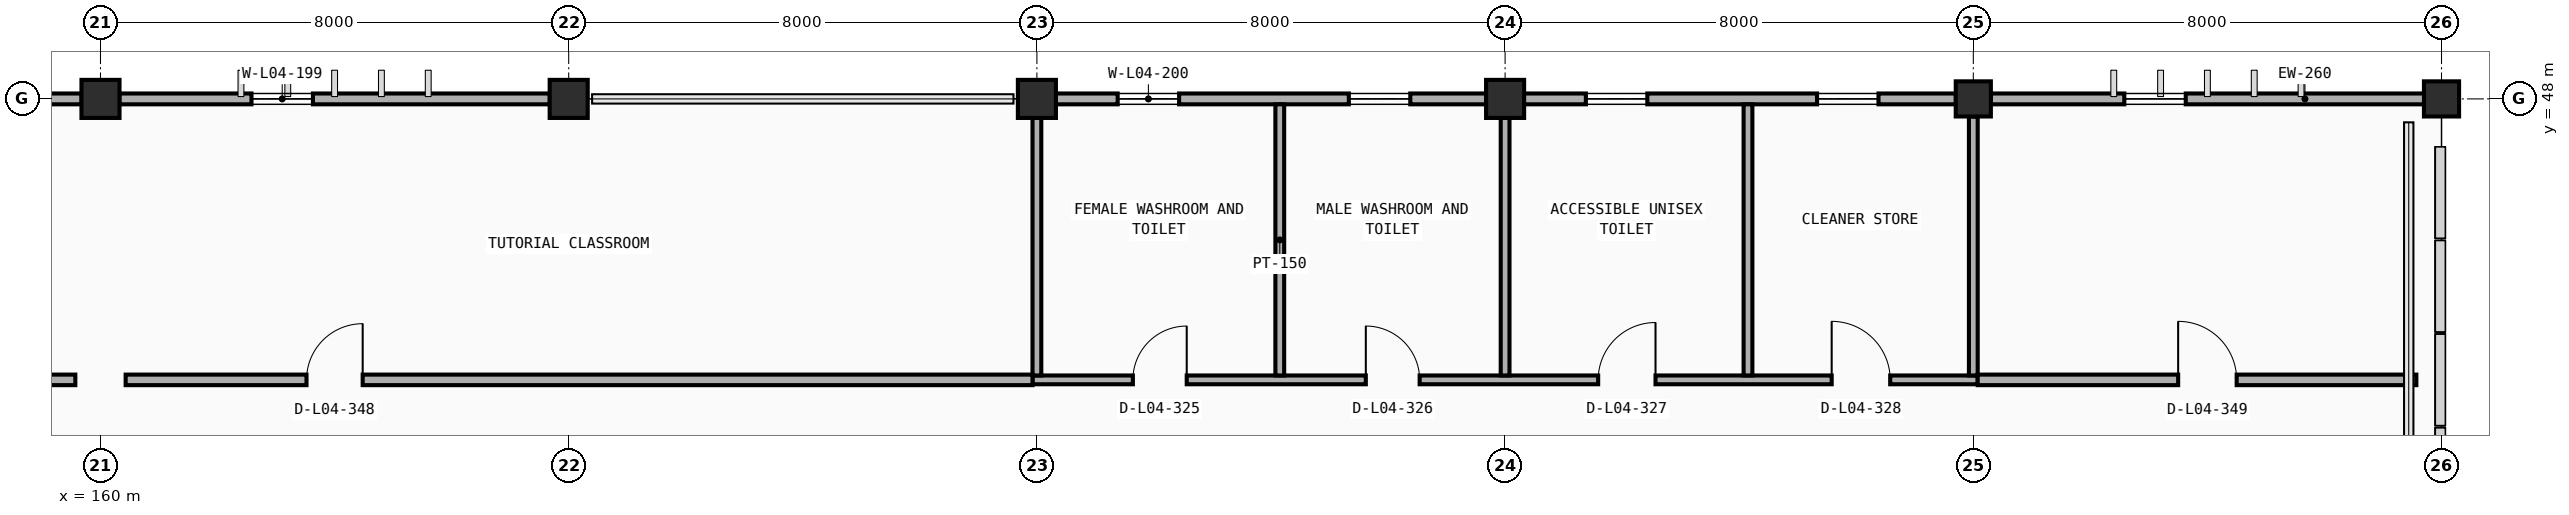
"""IFC4 building model, lengths in metres.
Left out: names, types, materials, properties, quantities, classifications, styles, units other than length and angle.
Written with IfcOpenShell. Run it as: python <this file> out.ifc"""

import sys

from ifc_helpers import new_model, si_unit, direction, frame, frame_2d, origin, origin_2d, place, context, subcontext, project, spatial, rectangle, extrude, element, fill, save


model = new_model("IFC4")
c1 = context("Model", 3, precision=1e-05, world=origin(), true_north=direction((0.0, 1.0)))
c2 = subcontext(c1, "Body", "Model", "MODEL_VIEW")
j1 = project(units=[si_unit("LENGTHUNIT", "METRE"), si_unit("PLANEANGLEUNIT", "RADIAN")], contexts=[c1])
p1 = place(None, origin())
s1 = spatial("IfcSite", under=j1, at=p1, CompositionType="ELEMENT")
p2 = place(p1, origin())
s2 = spatial("IfcBuilding", under=s1, at=p2, CompositionType="ELEMENT")
p3 = place(p2, frame((0.0, 0.0, 13.8)))
s3 = spatial("IfcBuildingStorey", under=s2, at=p3, CompositionType="ELEMENT", Elevation=13.8)
for number, where, z_axis, x_axis in (
    (1, (160.0, 48.0, 0.0), (0.0, 0.0, 1.0), (1.0, 0.0, 0.0)),
    (2, (168.0, 48.0, 0.0), (0.0, 0.0, 1.0), (1.0, 0.0, 0.0)),
    (3, (176.0, 48.0, 0.0), (0.0, 0.0, 1.0), (1.0, 0.0, 0.0)),
    (4, (184.0, 48.0, 0.0), (0.0, 0.0, 1.0), (1.0, 0.0, 0.0)),
):
    element("IfcColumn", number, at=place(p3, frame(where, z_axis=z_axis, x_axis=x_axis)), inside=s3, PredefinedType="COLUMN", context=c2, shape_type="SweptSolid", body=[
        extrude(rectangle(XDim=0.65, YDim=0.65, at=origin_2d()), origin(), (0.0, 0.0, 1.0), 4.2),
    ])
for number, where, z_axis, x_axis in (
    (5, (192.0, 48.0, 0.0), (0.0, 0.0, 1.0), (1.0, 0.0, 0.0)),
    (6, (200.0, 48.0, 0.0), (0.0, 0.0, 1.0), (1.0, 0.0, 0.0)),
):
    element("IfcColumn", number, at=place(p3, frame(where, z_axis=z_axis, x_axis=x_axis)), inside=s3, PredefinedType="COLUMN", context=c2, shape_type="SweptSolid", body=[
        extrude(rectangle(XDim=0.6, YDim=0.6, at=origin_2d()), origin(), (0.0, 0.0, 1.0), 4.2),
    ])
p4 = place(p3, frame((152.322, 48.0, 0.0), z_axis=(0.0, 0.0, 1.0), x_axis=(1.0, 0.0, 0.0)))
e7 = element("IfcWall", 7, at=p4, inside=s3, PredefinedType="STANDARD", context=c2, shape_type="SweptSolid", body=[
    extrude(rectangle(XDim=7.356, YDim=0.185, at=frame_2d((3.678, 0.0))), origin(), (0.0, 0.0, 1.0), 3.325),
])
p5 = place(p4, frame((2.258, 0.0, 0.9)))
e8 = element("IfcOpeningElement", 8, at=p5, cuts=e7, PredefinedType="OPENING", context=c2, shape_type="SweptSolid", body=[
    extrude(rectangle(XDim=1.65, YDim=1.85, at=frame_2d((0.825, 0.925))), frame((0.0, 0.103, 0.0), z_axis=(0.0, -1.0, 0.0), x_axis=(1.0, 0.0, 0.0)), (0.0, 0.0, 1.0), 0.205),
])
p6 = place(p3, frame((160.322, 48.0, 0.0), z_axis=(0.0, 0.0, 1.0), x_axis=(1.0, 0.0, 0.0)))
e9 = element("IfcWall", 9, at=p6, inside=s3, PredefinedType="STANDARD", context=c2, shape_type="SweptSolid", body=[
    extrude(rectangle(XDim=7.356, YDim=0.185, at=frame_2d((3.678, 0.0))), origin(), (0.0, 0.0, 1.0), 3.325),
])
p7 = place(p6, frame((2.258, 0.0, 0.9)))
e10 = element("IfcOpeningElement", 10, at=p7, cuts=e9, PredefinedType="OPENING", context=c2, shape_type="SweptSolid", body=[
    extrude(rectangle(XDim=1.05, YDim=1.85, at=frame_2d((0.525, 0.925))), frame((0.0, 0.103, 0.0), z_axis=(0.0, -1.0, 0.0), x_axis=(1.0, 0.0, 0.0)), (0.0, 0.0, 1.0), 0.205),
])
p8 = place(p3, frame((176.322, 48.0, 0.0), z_axis=(0.0, 0.0, 1.0), x_axis=(1.0, 0.0, 0.0)))
e11 = element("IfcWall", 11, at=p8, inside=s3, PredefinedType="STANDARD", context=c2, shape_type="SweptSolid", body=[
    extrude(rectangle(XDim=7.356, YDim=0.185, at=frame_2d((3.678, 0.0))), origin(), (0.0, 0.0, 1.0), 3.325),
])
p9 = place(p8, frame((1.058, 0.0, 1.15)))
e12 = element("IfcOpeningElement", 12, at=p9, cuts=e11, PredefinedType="OPENING", context=c2, shape_type="SweptSolid", body=[
    extrude(rectangle(XDim=1.05, YDim=1.25, at=frame_2d((0.525, 0.625))), frame((0.0, 0.103, 0.0), z_axis=(0.0, -1.0, 0.0), x_axis=(1.0, 0.0, 0.0)), (0.0, 0.0, 1.0), 0.205),
])
p10 = place(p8, frame((5.008, 0.0, 1.15)))
e13 = element("IfcOpeningElement", 13, at=p10, cuts=e11, PredefinedType="OPENING", context=c2, shape_type="SweptSolid", body=[
    extrude(rectangle(XDim=1.05, YDim=1.25, at=frame_2d((0.525, 0.625))), frame((0.0, 0.103, 0.0), z_axis=(0.0, -1.0, 0.0), x_axis=(1.0, 0.0, 0.0)), (0.0, 0.0, 1.0), 0.205),
])
p11 = place(p3, frame((184.322, 48.0, 0.0), z_axis=(0.0, 0.0, 1.0), x_axis=(1.0, 0.0, 0.0)))
e14 = element("IfcWall", 14, at=p11, inside=s3, PredefinedType="STANDARD", context=c2, shape_type="SweptSolid", body=[
    extrude(rectangle(XDim=7.381, YDim=0.185, at=frame_2d((3.69, 0.0))), origin(), (0.0, 0.0, 1.0), 3.325),
])
p12 = place(p11, frame((1.058, 0.0, 1.15)))
e15 = element("IfcOpeningElement", 15, at=p12, cuts=e14, PredefinedType="OPENING", context=c2, shape_type="SweptSolid", body=[
    extrude(rectangle(XDim=1.05, YDim=1.25, at=frame_2d((0.525, 0.625))), frame((0.0, 0.103, 0.0), z_axis=(0.0, -1.0, 0.0), x_axis=(1.0, 0.0, 0.0)), (0.0, 0.0, 1.0), 0.205),
])
p13 = place(p11, frame((5.008, 0.0, 1.15)))
e16 = element("IfcOpeningElement", 16, at=p13, cuts=e14, PredefinedType="OPENING", context=c2, shape_type="SweptSolid", body=[
    extrude(rectangle(XDim=1.05, YDim=1.25, at=frame_2d((0.525, 0.625))), frame((0.0, 0.103, 0.0), z_axis=(0.0, -1.0, 0.0), x_axis=(1.0, 0.0, 0.0)), (0.0, 0.0, 1.0), 0.205),
])
p14 = place(p3, frame((192.297, 48.0, 0.0), z_axis=(0.0, 0.0, 1.0), x_axis=(1.0, 0.0, 0.0)))
e17 = element("IfcWall", 17, at=p14, inside=s3, PredefinedType="STANDARD", context=c2, shape_type="SweptSolid", body=[
    extrude(rectangle(XDim=7.406, YDim=0.185, at=frame_2d((3.703, 0.0))), origin(), (0.0, 0.0, 1.0), 3.325),
])
p15 = place(p14, frame((2.283, 0.0, 0.9)))
e18 = element("IfcOpeningElement", 18, at=p15, cuts=e17, PredefinedType="OPENING", context=c2, shape_type="SweptSolid", body=[
    extrude(rectangle(XDim=1.05, YDim=1.85, at=frame_2d((0.525, 0.925))), frame((0.0, 0.103, 0.0), z_axis=(0.0, -1.0, 0.0), x_axis=(1.0, 0.0, 0.0)), (0.0, 0.0, 1.0), 0.205),
])
p16 = place(p3, frame((199.76, 47.78, 0.0), z_axis=(0.0, 0.0, 1.0), x_axis=(-1.0, 0.0, 0.0)))
e19 = element("IfcWall", 19, at=p16, inside=s3, PredefinedType="PARAPET", context=c2, shape_type="SweptSolid", body=[
    extrude(rectangle(XDim=0.32, YDim=0.2, at=frame_2d((0.16, 0.0))), origin(), (0.0, 0.0, 1.0), 3.35),
])
p17 = place(p3, frame((175.925, 43.2, 0.0), z_axis=(0.0, 0.0, 1.0), x_axis=(1.0, 0.0, 0.0)))
e20 = element("IfcWall", 20, at=p17, inside=s3, PredefinedType="PARTITIONING", context=c2, shape_type="SweptSolid", body=[
    extrude(rectangle(XDim=16.15, YDim=0.15, at=frame_2d((8.075, 0.0))), origin(), (0.0, 0.0, 1.0), 3.3),
])
p18 = place(p17, frame((1.715, 0.0, 0.0)))
e21 = element("IfcOpeningElement", 21, at=p18, cuts=e20, PredefinedType="OPENING", context=c2, shape_type="SweptSolid", body=[
    extrude(rectangle(XDim=0.92, YDim=2.12, at=frame_2d((0.46, 1.06))), frame((0.0, 0.085, 0.0), z_axis=(0.0, -1.0, 0.0), x_axis=(1.0, 0.0, 0.0)), (0.0, 0.0, 1.0), 0.17),
])
p19 = place(p17, frame((5.695, 0.0, 0.0)))
e22 = element("IfcOpeningElement", 22, at=p19, cuts=e20, PredefinedType="OPENING", context=c2, shape_type="SweptSolid", body=[
    extrude(rectangle(XDim=0.92, YDim=2.12, at=frame_2d((0.46, 1.06))), frame((0.0, 0.085, 0.0), z_axis=(0.0, -1.0, 0.0), x_axis=(1.0, 0.0, 0.0)), (0.0, 0.0, 1.0), 0.17),
])
p20 = place(p17, frame((9.665, 0.0, 0.0)))
e23 = element("IfcOpeningElement", 23, at=p20, cuts=e20, PredefinedType="OPENING", context=c2, shape_type="SweptSolid", body=[
    extrude(rectangle(XDim=0.98, YDim=2.12, at=frame_2d((0.49, 1.06))), frame((0.0, 0.085, 0.0), z_axis=(0.0, -1.0, 0.0), x_axis=(1.0, 0.0, 0.0)), (0.0, 0.0, 1.0), 0.17),
])
p21 = place(p17, frame((13.655, 0.0, 0.0)))
e24 = element("IfcOpeningElement", 24, at=p21, cuts=e20, PredefinedType="OPENING", context=c2, shape_type="SweptSolid", body=[
    extrude(rectangle(XDim=1.0, YDim=2.15, at=frame_2d((0.5, 1.075))), frame((0.0, 0.085, 0.0), z_axis=(0.0, -1.0, 0.0), x_axis=(1.0, 0.0, 0.0)), (0.0, 0.0, 1.0), 0.17),
])
p22 = place(p3, frame((176.0, 43.275, 0.0), z_axis=(0.0, 0.0, 1.0), x_axis=(0.0, 1.0, 0.0)))
e25 = element("IfcWall", 25, at=p22, inside=s3, PredefinedType="PARTITIONING", context=c2, shape_type="SweptSolid", body=[
    extrude(rectangle(XDim=4.4, YDim=0.15, at=frame_2d((2.2, 0.0))), origin(), (0.0, 0.0, 1.0), 3.225),
])
p23 = place(p3, frame((180.15, 43.275, 0.0), z_axis=(0.0, 0.0, 1.0), x_axis=(0.0, 1.0, 0.0)))
e26 = element("IfcWall", 26, at=p23, inside=s3, PredefinedType="PARTITIONING", context=c2, shape_type="SweptSolid", body=[
    extrude(rectangle(XDim=4.633, YDim=0.15, at=frame_2d((2.316, 0.0))), origin(), (0.0, 0.0, 1.0), 3.3),
])
p24 = place(p3, frame((184.0, 43.275, 0.0), z_axis=(0.0, 0.0, 1.0), x_axis=(0.0, 1.0, 0.0)))
e27 = element("IfcWall", 27, at=p24, inside=s3, PredefinedType="PARTITIONING", context=c2, shape_type="SweptSolid", body=[
    extrude(rectangle(XDim=4.4, YDim=0.15, at=frame_2d((2.2, 0.0))), origin(), (0.0, 0.0, 1.0), 3.225),
])
p25 = place(p3, frame((188.15, 43.275, 0.0), z_axis=(0.0, 0.0, 1.0), x_axis=(0.0, 1.0, 0.0)))
e28 = element("IfcWall", 28, at=p25, inside=s3, PredefinedType="PARTITIONING", context=c2, shape_type="SweptSolid", body=[
    extrude(rectangle(XDim=4.633, YDim=0.15, at=frame_2d((2.316, 0.0))), origin(), (0.0, 0.0, 1.0), 3.3),
])
p26 = place(p3, frame((192.0, 43.275, 0.0), z_axis=(0.0, 0.0, 1.0), x_axis=(0.0, 1.0, 0.0)))
e29 = element("IfcWall", 29, at=p26, inside=s3, PredefinedType="PARTITIONING", context=c2, shape_type="SweptSolid", body=[
    extrude(rectangle(XDim=4.425, YDim=0.15, at=frame_2d((2.212, 0.0))), origin(), (0.0, 0.0, 1.0), 3.225),
])
p27 = place(p3, frame((128.43, 43.2, 0.0), z_axis=(0.0, 0.0, 1.0), x_axis=(1.0, 0.0, 0.0)))
e30 = element("IfcWall", 30, at=p27, inside=s3, PredefinedType="PARTITIONING", context=c2, shape_type="SweptSolid", body=[
    extrude(rectangle(XDim=31.14, YDim=0.18, at=frame_2d((15.57, 0.0))), origin(), (0.0, 0.0, 1.0), 3.3),
])
p28 = place(p27, frame((3.11, 0.0, 0.0)))
e31 = element("IfcOpeningElement", 31, at=p28, cuts=e30, PredefinedType="OPENING", context=c2, shape_type="SweptSolid", body=[
    extrude(rectangle(XDim=0.92, YDim=2.15, at=frame_2d((0.46, 1.075))), frame((0.0, 0.1, 0.0), z_axis=(0.0, -1.0, 0.0), x_axis=(1.0, 0.0, 0.0)), (0.0, 0.0, 1.0), 0.2),
])
p29 = place(p3, frame((160.43, 43.2, 0.0), z_axis=(0.0, 0.0, 1.0), x_axis=(1.0, 0.0, 0.0)))
e32 = element("IfcWall", 32, at=p29, inside=s3, PredefinedType="PARTITIONING", context=c2, shape_type="SweptSolid", body=[
    extrude(rectangle(XDim=15.495, YDim=0.18, at=frame_2d((7.748, 0.0))), origin(), (0.0, 0.0, 1.0), 3.3),
])
p30 = place(p29, frame((3.09, 0.0, 0.0)))
e33 = element("IfcOpeningElement", 33, at=p30, cuts=e32, PredefinedType="OPENING", context=c2, shape_type="SweptSolid", body=[
    extrude(rectangle(XDim=0.96, YDim=2.15, at=frame_2d((0.48, 1.075))), frame((0.0, 0.1, 0.0), z_axis=(0.0, -1.0, 0.0), x_axis=(1.0, 0.0, 0.0)), (0.0, 0.0, 1.0), 0.2),
])
p31 = place(p3, frame((192.075, 43.2, 0.0), z_axis=(0.0, 0.0, 1.0), x_axis=(1.0, 0.0, 0.0)))
e34 = element("IfcWall", 34, at=p31, inside=s3, PredefinedType="PARTITIONING", context=c2, shape_type="SweptSolid", body=[
    extrude(rectangle(XDim=7.495, YDim=0.18, at=frame_2d((3.748, 0.0))), origin(), (0.0, 0.0, 1.0), 3.3),
])
p32 = place(p31, frame((3.425, 0.0, 0.0)))
e35 = element("IfcOpeningElement", 35, at=p32, cuts=e34, PredefinedType="OPENING", context=c2, shape_type="SweptSolid", body=[
    extrude(rectangle(XDim=1.0, YDim=2.15, at=frame_2d((0.5, 1.075))), frame((0.0, 0.1, 0.0), z_axis=(0.0, -1.0, 0.0), x_axis=(1.0, 0.0, 0.0)), (0.0, 0.0, 1.0), 0.2),
])
p33 = place(p7, origin())
e36 = element("IfcWindow", 36, at=p33, inside=s3, PartitioningType="SINGLE_PANEL", PredefinedType="WINDOW", context=c2, shape_type="SweptSolid", body=[
    extrude(rectangle(XDim=1.05, YDim=1.85, at=frame_2d((0.525, 0.925))), frame((0.0, 0.03, 0.0), z_axis=(0.0, -1.0, 0.0), x_axis=(1.0, 0.0, 0.0)), (0.0, 0.0, 1.0), 0.06),
])
fill(e10, e36)
p34 = place(p9, origin())
e37 = element("IfcWindow", 37, at=p34, inside=s3, PartitioningType="SINGLE_PANEL", PredefinedType="WINDOW", context=c2, shape_type="SweptSolid", body=[
    extrude(rectangle(XDim=1.05, YDim=1.25, at=frame_2d((0.525, 0.625))), frame((0.0, 0.03, 0.0), z_axis=(0.0, -1.0, 0.0), x_axis=(1.0, 0.0, 0.0)), (0.0, 0.0, 1.0), 0.06),
])
fill(e12, e37)
p35 = place(p10, origin())
e38 = element("IfcWindow", 38, at=p35, inside=s3, PartitioningType="SINGLE_PANEL", PredefinedType="WINDOW", context=c2, shape_type="SweptSolid", body=[
    extrude(rectangle(XDim=1.05, YDim=1.25, at=frame_2d((0.525, 0.625))), frame((0.0, 0.03, 0.0), z_axis=(0.0, -1.0, 0.0), x_axis=(1.0, 0.0, 0.0)), (0.0, 0.0, 1.0), 0.06),
])
fill(e13, e38)
p36 = place(p12, origin())
e39 = element("IfcWindow", 39, at=p36, inside=s3, PartitioningType="SINGLE_PANEL", PredefinedType="WINDOW", context=c2, shape_type="SweptSolid", body=[
    extrude(rectangle(XDim=1.05, YDim=1.25, at=frame_2d((0.525, 0.625))), frame((0.0, 0.03, 0.0), z_axis=(0.0, -1.0, 0.0), x_axis=(1.0, 0.0, 0.0)), (0.0, 0.0, 1.0), 0.06),
])
fill(e15, e39)
p37 = place(p13, origin())
e40 = element("IfcWindow", 40, at=p37, inside=s3, PartitioningType="SINGLE_PANEL", PredefinedType="WINDOW", context=c2, shape_type="SweptSolid", body=[
    extrude(rectangle(XDim=1.05, YDim=1.25, at=frame_2d((0.525, 0.625))), frame((0.0, 0.03, 0.0), z_axis=(0.0, -1.0, 0.0), x_axis=(1.0, 0.0, 0.0)), (0.0, 0.0, 1.0), 0.06),
])
fill(e16, e40)
p38 = place(p15, origin())
e41 = element("IfcWindow", 41, at=p38, inside=s3, PartitioningType="SINGLE_PANEL", PredefinedType="WINDOW", context=c2, shape_type="SweptSolid", body=[
    extrude(rectangle(XDim=1.05, YDim=1.85, at=frame_2d((0.525, 0.925))), frame((0.0, 0.03, 0.0), z_axis=(0.0, -1.0, 0.0), x_axis=(1.0, 0.0, 0.0)), (0.0, 0.0, 1.0), 0.06),
])
fill(e18, e41)
p39 = place(p18, origin())
e42 = element("IfcDoor", 42, at=p39, inside=s3, OperationType="SINGLE_SWING_RIGHT", PredefinedType="DOOR", context=c2, shape_type="SweptSolid", body=[
    extrude(rectangle(XDim=0.92, YDim=2.12, at=frame_2d((0.46, 1.06))), frame((0.0, 0.025, 0.0), z_axis=(0.0, -1.0, 0.0), x_axis=(1.0, 0.0, 0.0)), (0.0, 0.0, 1.0), 0.05),
])
fill(e21, e42)
p40 = place(p19, origin())
e43 = element("IfcDoor", 43, at=p40, inside=s3, OperationType="SINGLE_SWING_LEFT", PredefinedType="DOOR", context=c2, shape_type="SweptSolid", body=[
    extrude(rectangle(XDim=0.92, YDim=2.12, at=frame_2d((0.46, 1.06))), frame((0.0, 0.025, 0.0), z_axis=(0.0, -1.0, 0.0), x_axis=(1.0, 0.0, 0.0)), (0.0, 0.0, 1.0), 0.05),
])
fill(e22, e43)
p41 = place(p20, origin())
e44 = element("IfcDoor", 44, at=p41, inside=s3, OperationType="SINGLE_SWING_RIGHT", PredefinedType="DOOR", context=c2, shape_type="SweptSolid", body=[
    extrude(rectangle(XDim=0.98, YDim=2.12, at=frame_2d((0.49, 1.06))), frame((0.0, 0.025, 0.0), z_axis=(0.0, -1.0, 0.0), x_axis=(1.0, 0.0, 0.0)), (0.0, 0.0, 1.0), 0.05),
])
fill(e23, e44)
p42 = place(p21, origin())
e45 = element("IfcDoor", 45, at=p42, inside=s3, OperationType="SINGLE_SWING_LEFT", PredefinedType="DOOR", context=c2, shape_type="SweptSolid", body=[
    extrude(rectangle(XDim=1.0, YDim=2.15, at=frame_2d((0.5, 1.075))), frame((0.0, 0.025, 0.0), z_axis=(0.0, -1.0, 0.0), x_axis=(1.0, 0.0, 0.0)), (0.0, 0.0, 1.0), 0.05),
])
fill(e24, e45)
p43 = place(p30, origin())
e46 = element("IfcDoor", 46, at=p43, inside=s3, OperationType="SINGLE_SWING_RIGHT", PredefinedType="DOOR", context=c2, shape_type="SweptSolid", body=[
    extrude(rectangle(XDim=0.96, YDim=2.15, at=frame_2d((0.48, 1.075))), frame((0.0, 0.025, 0.0), z_axis=(0.0, -1.0, 0.0), x_axis=(1.0, 0.0, 0.0)), (0.0, 0.0, 1.0), 0.05),
])
fill(e33, e46)
p44 = place(p32, origin())
e47 = element("IfcDoor", 47, at=p44, inside=s3, OperationType="SINGLE_SWING_LEFT", PredefinedType="DOOR", context=c2, shape_type="SweptSolid", body=[
    extrude(rectangle(XDim=1.0, YDim=2.15, at=frame_2d((0.5, 1.075))), frame((0.0, 0.025, 0.0), z_axis=(0.0, -1.0, 0.0), x_axis=(1.0, 0.0, 0.0)), (0.0, 0.0, 1.0), 0.05),
])
fill(e35, e47)
save(model, sys.argv[1])
